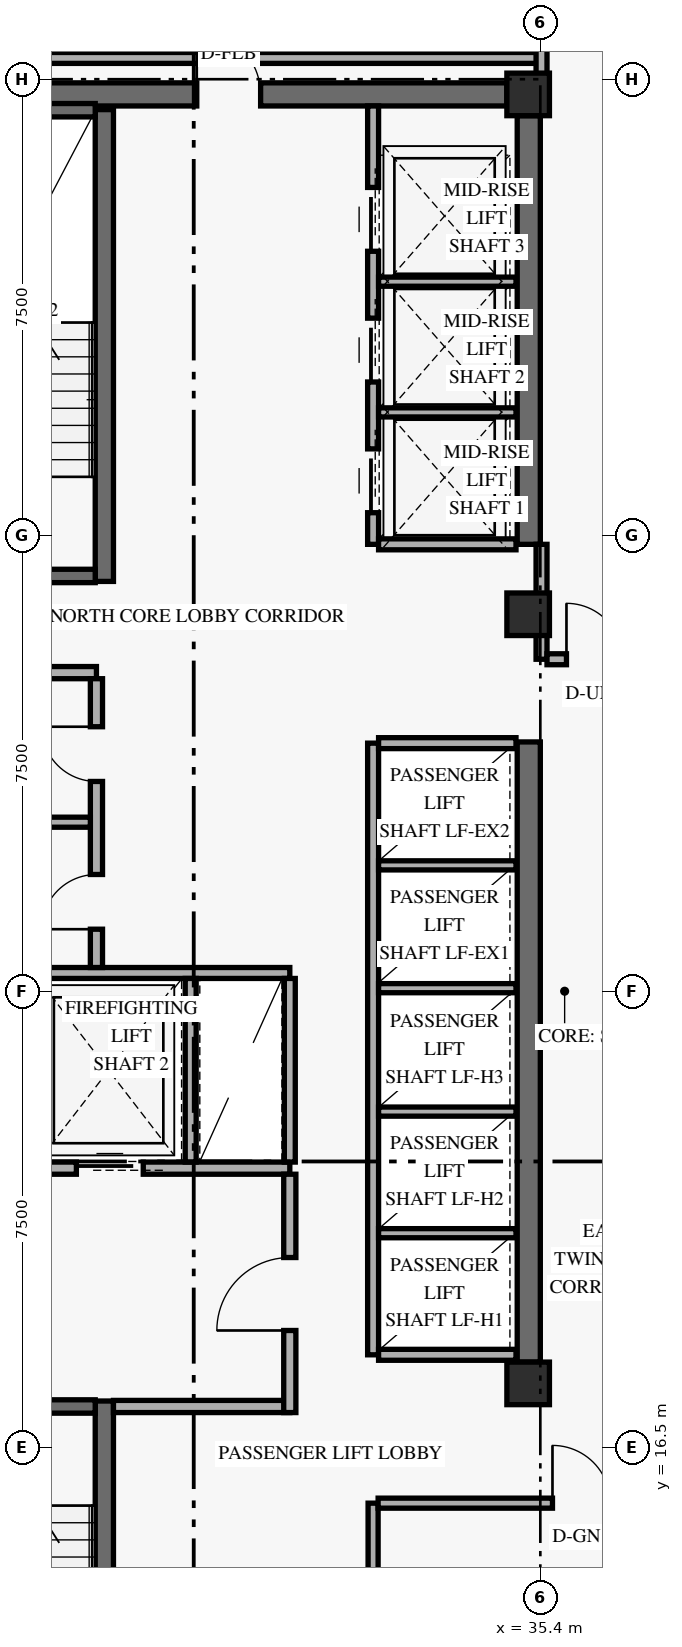
"""IFC4 building model, lengths in metres.
Left out: names, types, materials, properties, quantities, classifications, styles, units other than length and angle.
Written with IfcOpenShell. Run it as: python <this file> out.ifc"""

import sys

from ifc_helpers import new_model, si_unit, direction, frame, frame_2d, origin, origin_2d, place, context, subcontext, project, spatial, rectangle, extrude, element, fill, save


model = new_model("IFC4")
c1 = context("Model", 3, precision=1e-05, world=origin(), true_north=direction((0.0, 1.0)))
c2 = subcontext(c1, "Body", "Model", "MODEL_VIEW")
j1 = project(units=[si_unit("LENGTHUNIT", "METRE"), si_unit("PLANEANGLEUNIT", "RADIAN")], contexts=[c1])
p1 = place(None, origin())
s1 = spatial("IfcSite", under=j1, at=p1, CompositionType="ELEMENT")
p2 = place(p1, origin())
s2 = spatial("IfcBuilding", under=s1, at=p2, CompositionType="ELEMENT")
p3 = place(p2, frame((0.0, 0.0, 169.8)))
s3 = spatial("IfcBuildingStorey", under=s2, at=p3, CompositionType="ELEMENT", Elevation=169.8)
p4 = place(p3, frame((35.21, 17.9, 0.0), z_axis=(0.0, 0.0, 1.0), x_axis=(0.0, 1.0, 0.0)))
e1 = element("IfcWall", 1, at=p4, inside=s3, PredefinedType="SHEAR", context=c2, shape_type="SweptSolid", body=[
    extrude(rectangle(XDim=10.2, YDim=0.38, at=frame_2d((5.1, 0.0))), origin(), (0.0, 0.0, 1.0), 2.738),
])
p5 = place(p3, frame((35.21, 31.35, 0.0), z_axis=(0.0, 0.0, 1.0), x_axis=(0.0, 1.0, 0.0)))
e2 = element("IfcWall", 2, at=p5, inside=s3, PredefinedType="SHEAR", context=c2, shape_type="SweptSolid", body=[
    extrude(rectangle(XDim=7.05, YDim=0.38, at=frame_2d((3.525, 0.0))), origin(), (0.0, 0.0, 1.0), 2.738),
])
p6 = place(p3, frame((24.55, 38.75, 0.0), z_axis=(0.0, 0.0, 1.0), x_axis=(1.0, 0.0, 0.0)))
e3 = element("IfcWall", 3, at=p6, inside=s3, PredefinedType="SHEAR", context=c2, shape_type="SweptSolid", body=[
    extrude(rectangle(XDim=10.3, YDim=0.38, at=frame_2d((5.15, 0.0))), origin(), (0.0, 0.0, 1.0), 3.35),
])
p7 = place(p6, frame((5.2, 0.0, 0.0)))
e4 = element("IfcOpeningElement", 4, at=p7, cuts=e3, PredefinedType="OPENING", context=c2, shape_type="SweptSolid", body=[
    extrude(rectangle(XDim=1.05, YDim=2.15, at=frame_2d((0.525, 1.075))), frame((0.0, 0.2, 0.0), z_axis=(0.0, -1.0, 0.0), x_axis=(1.0, 0.0, 0.0)), (0.0, 0.0, 1.0), 0.4),
])
p8 = place(p3, frame((28.23, 9.5, 0.0), z_axis=(0.0, 0.0, 1.0), x_axis=(0.0, 1.0, 0.0)))
e5 = element("IfcWall", 5, at=p8, inside=s3, PredefinedType="SHEAR", context=c2, shape_type="SweptSolid", body=[
    extrude(rectangle(XDim=7.76, YDim=0.3, at=frame_2d((3.88, 0.0))), origin(), (0.0, 0.0, 1.0), 3.35),
])
p9 = place(p3, frame((24.92, 17.17, 0.0), z_axis=(0.0, 0.0, 1.0), x_axis=(1.0, 0.0, 0.0)))
e6 = element("IfcWall", 6, at=p9, inside=s3, PredefinedType="SHEAR", context=c2, shape_type="SweptSolid", body=[
    extrude(rectangle(XDim=3.16, YDim=0.22, at=frame_2d((1.58, 0.0))), origin(), (0.0, 0.0, 1.0), 3.35),
])
p10 = place(p9, frame((0.78, 0.0, 0.0)))
e7 = element("IfcOpeningElement", 7, at=p10, cuts=e6, PredefinedType="OPENING", context=c2, shape_type="SweptSolid", body=[
    extrude(rectangle(XDim=1.05, YDim=2.15, at=frame_2d((0.525, 1.075))), frame((0.0, 0.12, 0.0), z_axis=(0.0, -1.0, 0.0), x_axis=(1.0, 0.0, 0.0)), (0.0, 0.0, 1.0), 0.24),
])
p11 = place(p3, frame((28.23, 30.74, 0.0), z_axis=(0.0, 0.0, 1.0), x_axis=(0.0, 1.0, 0.0)))
e8 = element("IfcWall", 8, at=p11, inside=s3, PredefinedType="SHEAR", context=c2, shape_type="SweptSolid", body=[
    extrude(rectangle(XDim=7.76, YDim=0.3, at=frame_2d((3.88, 0.0))), origin(), (0.0, 0.0, 1.0), 3.35),
])
p12 = place(p3, frame((24.92, 30.83, 0.0), z_axis=(0.0, 0.0, 1.0), x_axis=(1.0, 0.0, 0.0)))
e9 = element("IfcWall", 9, at=p12, inside=s3, PredefinedType="SHEAR", context=c2, shape_type="SweptSolid", body=[
    extrude(rectangle(XDim=3.16, YDim=0.22, at=frame_2d((1.58, 0.0))), origin(), (0.0, 0.0, 1.0), 3.35),
])
p13 = place(p12, frame((0.78, 0.0, 0.0)))
e10 = element("IfcOpeningElement", 10, at=p13, cuts=e9, PredefinedType="OPENING", context=c2, shape_type="SweptSolid", body=[
    extrude(rectangle(XDim=1.05, YDim=2.15, at=frame_2d((0.525, 1.075))), frame((0.0, 0.12, 0.0), z_axis=(0.0, -1.0, 0.0), x_axis=(1.0, 0.0, 0.0)), (0.0, 0.0, 1.0), 0.24),
])
p14 = place(p3, frame((24.92, 38.49, 0.0), z_axis=(0.0, 0.0, 1.0), x_axis=(1.0, 0.0, 0.0)))
e11 = element("IfcWall", 11, at=p14, inside=s3, PredefinedType="SHEAR", context=c2, shape_type="SweptSolid", body=[
    extrude(rectangle(XDim=3.16, YDim=0.22, at=frame_2d((1.58, 0.0))), origin(), (0.0, 0.0, 1.0), 3.35),
])
for number, where, z_axis, x_axis in (
    (12, (35.2, 17.55, 0.0), (0.0, 0.0, 1.0), (1.0, 0.0, 0.0)),
    (13, (35.2, 30.2, 0.0), (0.0, 0.0, 1.0), (1.0, 0.0, 0.0)),
    (14, (35.2, 38.75, 0.0), (0.0, 0.0, 1.0), (1.0, 0.0, 0.0)),
):
    element("IfcColumn", number, at=place(p3, frame(where, z_axis=z_axis, x_axis=x_axis)), inside=s3, PredefinedType="COLUMN", context=c2, shape_type="SweptSolid", body=[
        extrude(rectangle(XDim=0.7, YDim=0.7, at=origin_2d()), origin(), (0.0, 0.0, 1.0), 3.6),
    ])
p15 = place(p3, frame((24.45, 21.09, 0.0), z_axis=(0.0, 0.0, 1.0), x_axis=(1.0, 0.0, 0.0)))
e15 = element("IfcWall", 15, at=p15, inside=s3, PredefinedType="STANDARD", context=c2, shape_type="SweptSolid", body=[
    extrude(rectangle(XDim=6.83, YDim=0.2, at=frame_2d((3.415, 0.0))), origin(), (0.0, 0.0, 1.0), 3.35),
])
p16 = place(p15, frame((0.72, 0.0, 0.0)))
e16 = element("IfcOpeningElement", 16, at=p16, cuts=e15, PredefinedType="OPENING", context=c2, shape_type="SweptSolid", body=[
    extrude(rectangle(XDim=1.1, YDim=2.2, at=frame_2d((0.55, 1.1))), frame((0.0, 0.11, 0.0), z_axis=(0.0, -1.0, 0.0), x_axis=(1.0, 0.0, 0.0)), (0.0, 0.0, 1.0), 0.22),
])
p17 = place(p15, frame((3.32, 0.0, 0.0)))
e17 = element("IfcOpeningElement", 17, at=p17, cuts=e15, PredefinedType="OPENING", context=c2, shape_type="SweptSolid", body=[
    extrude(rectangle(XDim=1.1, YDim=2.2, at=frame_2d((0.55, 1.1))), frame((0.0, 0.11, 0.0), z_axis=(0.0, -1.0, 0.0), x_axis=(1.0, 0.0, 0.0)), (0.0, 0.0, 1.0), 0.22),
])
p18 = place(p3, frame((28.38, 17.17, 0.0), z_axis=(0.0, 0.0, 1.0), x_axis=(1.0, 0.0, 0.0)))
e18 = element("IfcWall", 18, at=p18, inside=s3, PredefinedType="STANDARD", context=c2, shape_type="SweptSolid", body=[
    extrude(rectangle(XDim=2.9, YDim=0.2, at=frame_2d((1.45, 0.0))), origin(), (0.0, 0.0, 1.0), 3.35),
])
p19 = place(p3, frame((31.28, 17.07, 0.0), z_axis=(0.0, 0.0, 1.0), x_axis=(0.0, 1.0, 0.0)))
e19 = element("IfcWall", 19, at=p19, inside=s3, PredefinedType="STANDARD", context=c2, shape_type="SweptSolid", body=[
    extrude(rectangle(XDim=3.92, YDim=0.2, at=frame_2d((1.96, 0.0))), origin(), (0.0, 0.0, 1.0), 2.72),
])
p20 = place(p19, frame((1.35, 0.0, 0.0)))
e20 = element("IfcOpeningElement", 20, at=p20, cuts=e19, PredefinedType="OPENING", context=c2, shape_type="SweptSolid", body=[
    extrude(rectangle(XDim=1.2, YDim=2.15, at=frame_2d((0.6, 1.075))), frame((0.0, 0.11, 0.0), z_axis=(0.0, -1.0, 0.0), x_axis=(1.0, 0.0, 0.0)), (0.0, 0.0, 1.0), 0.22),
])
p21 = place(p3, frame((24.45, 24.3, 0.0), z_axis=(0.0, 0.0, 1.0), x_axis=(1.0, 0.0, 0.0)))
e21 = element("IfcWall", 21, at=p21, inside=s3, PredefinedType="STANDARD", context=c2, shape_type="SweptSolid", body=[
    extrude(rectangle(XDim=6.83, YDim=0.18, at=frame_2d((3.415, 0.0))), origin(), (0.0, 0.0, 1.0), 3.35),
])
for number, where, z_axis, x_axis in (
    (22, (29.65, 21.19, 0.0), (0.0, 0.0, 1.0), (0.0, 1.0, 0.0)),
    (23, (31.28, 21.19, 0.0), (0.0, 0.0, 1.0), (0.0, 1.0, 0.0)),
):
    element("IfcWall", number, at=place(p3, frame(where, z_axis=z_axis, x_axis=x_axis)), inside=s3, PredefinedType="STANDARD", context=c2, shape_type="SweptSolid", body=[
        extrude(rectangle(XDim=3.02, YDim=0.18, at=frame_2d((1.51, 0.0))), origin(), (0.0, 0.0, 1.0), 3.35),
    ])
p22 = place(p3, frame((24.45, 29.24, 0.0), z_axis=(0.0, 0.0, 1.0), x_axis=(1.0, 0.0, 0.0)))
e24 = element("IfcWall", 24, at=p22, inside=s3, PredefinedType="STANDARD", context=c2, shape_type="SweptSolid", body=[
    extrude(rectangle(XDim=3.65, YDim=0.2, at=frame_2d((1.825, 0.0))), origin(), (0.0, 0.0, 1.0), 3.35),
])
p23 = place(p3, frame((28.1, 24.39, 0.0), z_axis=(0.0, 0.0, 1.0), x_axis=(0.0, 1.0, 0.0)))
e25 = element("IfcWall", 25, at=p23, inside=s3, PredefinedType="STANDARD", context=c2, shape_type="SweptSolid", body=[
    extrude(rectangle(XDim=4.75, YDim=0.2, at=frame_2d((2.375, 0.0))), origin(), (0.0, 0.0, 1.0), 3.35),
])
p24 = place(p23, frame((0.63, 0.0, 0.0)))
e26 = element("IfcOpeningElement", 26, at=p24, cuts=e25, PredefinedType="OPENING", context=c2, shape_type="SweptSolid", body=[
    extrude(rectangle(XDim=0.9, YDim=2.1, at=frame_2d((0.45, 1.05))), frame((0.0, 0.11, 0.0), z_axis=(0.0, -1.0, 0.0), x_axis=(1.0, 0.0, 0.0)), (0.0, 0.0, 1.0), 0.22),
])
p25 = place(p23, frame((3.06, 0.0, 0.0)))
e27 = element("IfcOpeningElement", 27, at=p25, cuts=e25, PredefinedType="OPENING", context=c2, shape_type="SweptSolid", body=[
    extrude(rectangle(XDim=0.9, YDim=2.1, at=frame_2d((0.45, 1.05))), frame((0.0, 0.11, 0.0), z_axis=(0.0, -1.0, 0.0), x_axis=(1.0, 0.0, 0.0)), (0.0, 0.0, 1.0), 0.22),
])
p26 = place(p3, frame((24.45, 26.78, 0.0), z_axis=(0.0, 0.0, 1.0), x_axis=(1.0, 0.0, 0.0)))
e28 = element("IfcWall", 28, at=p26, inside=s3, PredefinedType="PARTITIONING", context=c2, shape_type="SweptSolid", body=[
    extrude(rectangle(XDim=3.55, YDim=0.165, at=frame_2d((1.775, 0.0))), origin(), (0.0, 0.0, 1.0), 3.35),
])
p27 = place(p3, frame((32.65, 18.02, 0.0), z_axis=(0.0, 0.0, 1.0), x_axis=(0.0, 1.0, 0.0)))
e29 = element("IfcWall", 29, at=p27, inside=s3, PredefinedType="STANDARD", context=c2, shape_type="SweptSolid", body=[
    extrude(rectangle(XDim=10.06, YDim=0.18, at=frame_2d((5.03, 0.0))), origin(), (0.0, 0.0, 1.0), 3.35),
])
for number, where, z_axis, x_axis in (
    (30, (32.74, 18.02, 0.0), (0.0, 0.0, 1.0), (1.0, 0.0, 0.0)),
    (31, (32.74, 28.08, 0.0), (0.0, 0.0, 1.0), (1.0, 0.0, 0.0)),
):
    element("IfcWall", number, at=place(p3, frame(where, z_axis=z_axis, x_axis=x_axis)), inside=s3, PredefinedType="STANDARD", context=c2, shape_type="SweptSolid", body=[
        extrude(rectangle(XDim=2.26, YDim=0.18, at=frame_2d((1.13, 0.0))), origin(), (0.0, 0.0, 1.0), 3.35),
    ])
for number, where, z_axis, x_axis in (
    (32, (32.74, 20.02, 0.0), (0.0, 0.0, 1.0), (1.0, 0.0, 0.0)),
    (33, (32.74, 22.02, 0.0), (0.0, 0.0, 1.0), (1.0, 0.0, 0.0)),
    (34, (32.74, 24.05, 0.0), (0.0, 0.0, 1.0), (1.0, 0.0, 0.0)),
    (35, (32.74, 26.07, 0.0), (0.0, 0.0, 1.0), (1.0, 0.0, 0.0)),
):
    element("IfcWall", number, at=place(p3, frame(where, z_axis=z_axis, x_axis=x_axis)), inside=s3, PredefinedType="STANDARD", context=c2, shape_type="SweptSolid", body=[
        extrude(rectangle(XDim=2.26, YDim=0.15, at=frame_2d((1.13, 0.0))), origin(), (0.0, 0.0, 1.0), 3.35),
    ])
p28 = place(p3, frame((32.65, 31.35, 0.0), z_axis=(0.0, 0.0, 1.0), x_axis=(0.0, 1.0, 0.0)))
e36 = element("IfcWall", 36, at=p28, inside=s3, PredefinedType="STANDARD", context=c2, shape_type="SweptSolid", body=[
    extrude(rectangle(XDim=7.21, YDim=0.18, at=frame_2d((3.605, 0.0))), origin(), (0.0, 0.0, 1.0), 3.35),
])
p29 = place(p28, frame((0.52, 0.0, 0.0)))
e37 = element("IfcOpeningElement", 37, at=p29, cuts=e36, PredefinedType="OPENING", context=c2, shape_type="SweptSolid", body=[
    extrude(rectangle(XDim=1.05, YDim=2.2, at=frame_2d((0.525, 1.1))), frame((0.0, 0.1, 0.0), z_axis=(0.0, -1.0, 0.0), x_axis=(1.0, 0.0, 0.0)), (0.0, 0.0, 1.0), 0.2),
])
p30 = place(p28, frame((2.67, 0.0, 0.0)))
e38 = element("IfcOpeningElement", 38, at=p30, cuts=e36, PredefinedType="OPENING", context=c2, shape_type="SweptSolid", body=[
    extrude(rectangle(XDim=1.05, YDim=2.2, at=frame_2d((0.525, 1.1))), frame((0.0, 0.1, 0.0), z_axis=(0.0, -1.0, 0.0), x_axis=(1.0, 0.0, 0.0)), (0.0, 0.0, 1.0), 0.2),
])
p31 = place(p28, frame((4.82, 0.0, 0.0)))
e39 = element("IfcOpeningElement", 39, at=p31, cuts=e36, PredefinedType="OPENING", context=c2, shape_type="SweptSolid", body=[
    extrude(rectangle(XDim=1.05, YDim=2.2, at=frame_2d((0.525, 1.1))), frame((0.0, 0.1, 0.0), z_axis=(0.0, -1.0, 0.0), x_axis=(1.0, 0.0, 0.0)), (0.0, 0.0, 1.0), 0.2),
])
p32 = place(p3, frame((32.74, 31.35, 0.0), z_axis=(0.0, 0.0, 1.0), x_axis=(1.0, 0.0, 0.0)))
e40 = element("IfcWall", 40, at=p32, inside=s3, PredefinedType="STANDARD", context=c2, shape_type="SweptSolid", body=[
    extrude(rectangle(XDim=2.26, YDim=0.18, at=frame_2d((1.13, 0.0))), origin(), (0.0, 0.0, 1.0), 3.35),
])
for number, where, z_axis, x_axis in (
    (41, (32.74, 33.52, 0.0), (0.0, 0.0, 1.0), (1.0, 0.0, 0.0)),
    (42, (32.74, 35.67, 0.0), (0.0, 0.0, 1.0), (1.0, 0.0, 0.0)),
):
    element("IfcWall", number, at=place(p3, frame(where, z_axis=z_axis, x_axis=x_axis)), inside=s3, PredefinedType="STANDARD", context=c2, shape_type="SweptSolid", body=[
        extrude(rectangle(XDim=2.26, YDim=0.15, at=frame_2d((1.13, 0.0))), origin(), (0.0, 0.0, 1.0), 3.35),
    ])
p33 = place(p3, frame((32.65, 9.5, 0.0), z_axis=(0.0, 0.0, 1.0), x_axis=(0.0, 1.0, 0.0)))
e43 = element("IfcWall", 43, at=p33, inside=s3, PredefinedType="PARTITIONING", context=c2, shape_type="SweptSolid", body=[
    extrude(rectangle(XDim=6.08, YDim=0.165, at=frame_2d((3.04, 0.0))), origin(), (0.0, 0.0, 1.0), 3.35),
])
p34 = place(p3, frame((32.732, 15.58, 0.0), z_axis=(0.0, 0.0, 1.0), x_axis=(1.0, 0.0, 0.0)))
e44 = element("IfcWall", 44, at=p34, inside=s3, PredefinedType="PARTITIONING", context=c2, shape_type="SweptSolid", body=[
    extrude(rectangle(XDim=5.618, YDim=0.165, at=frame_2d((2.809, 0.0))), origin(), (0.0, 0.0, 1.0), 2.72),
])
p35 = place(p34, frame((2.867, 0.0, 0.0)))
e45 = element("IfcOpeningElement", 45, at=p35, cuts=e44, PredefinedType="OPENING", context=c2, shape_type="SweptSolid", body=[
    extrude(rectangle(XDim=0.95, YDim=2.15, at=frame_2d((0.475, 1.075))), frame((0.0, 0.093, 0.0), z_axis=(0.0, -1.0, 0.0), x_axis=(1.0, 0.0, 0.0)), (0.0, 0.0, 1.0), 0.185),
])
p36 = place(p3, frame((35.42, 29.46, 0.0), z_axis=(0.0, 0.0, 1.0), x_axis=(0.0, 1.0, 0.0)))
e46 = element("IfcWall", 46, at=p36, inside=s3, PredefinedType="STANDARD", context=c2, shape_type="SweptSolid", body=[
    extrude(rectangle(XDim=1.89, YDim=0.18, at=frame_2d((0.945, 0.0))), origin(), (0.0, 0.0, 1.0), 2.72),
])
p37 = place(p3, frame((35.51, 29.46, 0.0), z_axis=(0.0, 0.0, 1.0), x_axis=(1.0, 0.0, 0.0)))
e47 = element("IfcWall", 47, at=p37, inside=s3, PredefinedType="STANDARD", context=c2, shape_type="SweptSolid", body=[
    extrude(rectangle(XDim=13.29, YDim=0.18, at=frame_2d((6.645, 0.0))), origin(), (0.0, 0.0, 1.0), 2.72),
])
p38 = place(p37, frame((0.32, 0.0, 0.0)))
e48 = element("IfcOpeningElement", 48, at=p38, cuts=e47, PredefinedType="OPENING", context=c2, shape_type="SweptSolid", body=[
    extrude(rectangle(XDim=0.92, YDim=2.15, at=frame_2d((0.46, 1.075))), frame((0.0, 0.1, 0.0), z_axis=(0.0, -1.0, 0.0), x_axis=(1.0, 0.0, 0.0)), (0.0, 0.0, 1.0), 0.2),
])
p39 = place(p3, frame((23.85, 39.35, 0.0), z_axis=(0.0, 0.0, 1.0), x_axis=(1.0, 0.0, 0.0)))
e49 = element("IfcWall", 49, at=p39, inside=s3, PredefinedType="STANDARD", context=c2, shape_type="SweptSolid", body=[
    extrude(rectangle(XDim=11.57, YDim=0.18, at=frame_2d((5.785, 0.0))), origin(), (0.0, 0.0, 1.0), 2.72),
])
p40 = place(p3, frame((35.42, 38.75, 0.0), z_axis=(0.0, 0.0, 1.0), x_axis=(0.0, 1.0, 0.0)))
e50 = element("IfcWall", 50, at=p40, inside=s3, PredefinedType="PARTITIONING", context=c2, shape_type="SweptSolid", body=[
    extrude(rectangle(XDim=4.97, YDim=0.18, at=frame_2d((2.485, 0.0))), origin(), (0.0, 0.0, 1.0), 2.72),
])
p41 = place(p17, origin())
e51 = element("IfcDoor", 51, at=p41, inside=s3, OperationType="SLIDING_TO_LEFT", PredefinedType="DOOR", context=c2, shape_type="SweptSolid", body=[
    extrude(rectangle(XDim=1.1, YDim=2.2, at=frame_2d((0.55, 1.1))), frame((0.0, 0.025, 0.0), z_axis=(0.0, -1.0, 0.0), x_axis=(1.0, 0.0, 0.0)), (0.0, 0.0, 1.0), 0.05),
])
fill(e17, e51)
p42 = place(p20, origin())
e52 = element("IfcDoor", 52, at=p42, inside=s3, OperationType="SINGLE_SWING_LEFT", PredefinedType="DOOR", context=c2, shape_type="SweptSolid", body=[
    extrude(rectangle(XDim=1.2, YDim=2.15, at=frame_2d((0.6, 1.075))), frame((0.0, 0.025, 0.0), z_axis=(0.0, -1.0, 0.0), x_axis=(1.0, 0.0, 0.0)), (0.0, 0.0, 1.0), 0.05),
])
fill(e20, e52)
p43 = place(p24, origin())
e53 = element("IfcDoor", 53, at=p43, inside=s3, OperationType="SINGLE_SWING_LEFT", PredefinedType="DOOR", context=c2, shape_type="SweptSolid", body=[
    extrude(rectangle(XDim=0.9, YDim=2.1, at=frame_2d((0.45, 1.05))), frame((0.0, 0.025, 0.0), z_axis=(0.0, -1.0, 0.0), x_axis=(1.0, 0.0, 0.0)), (0.0, 0.0, 1.0), 0.05),
])
fill(e26, e53)
p44 = place(p25, origin())
e54 = element("IfcDoor", 54, at=p44, inside=s3, OperationType="SINGLE_SWING_RIGHT", PredefinedType="DOOR", context=c2, shape_type="SweptSolid", body=[
    extrude(rectangle(XDim=0.9, YDim=2.1, at=frame_2d((0.45, 1.05))), frame((0.0, 0.025, 0.0), z_axis=(0.0, -1.0, 0.0), x_axis=(1.0, 0.0, 0.0)), (0.0, 0.0, 1.0), 0.05),
])
fill(e27, e54)
p45 = place(p29, origin())
e55 = element("IfcDoor", 55, at=p45, inside=s3, OperationType="SLIDING_TO_LEFT", PredefinedType="DOOR", context=c2, shape_type="SweptSolid", body=[
    extrude(rectangle(XDim=1.05, YDim=2.2, at=frame_2d((0.525, 1.1))), frame((0.0, 0.025, 0.0), z_axis=(0.0, -1.0, 0.0), x_axis=(1.0, 0.0, 0.0)), (0.0, 0.0, 1.0), 0.05),
])
fill(e37, e55)
p46 = place(p30, origin())
e56 = element("IfcDoor", 56, at=p46, inside=s3, OperationType="SLIDING_TO_LEFT", PredefinedType="DOOR", context=c2, shape_type="SweptSolid", body=[
    extrude(rectangle(XDim=1.05, YDim=2.2, at=frame_2d((0.525, 1.1))), frame((0.0, 0.025, 0.0), z_axis=(0.0, -1.0, 0.0), x_axis=(1.0, 0.0, 0.0)), (0.0, 0.0, 1.0), 0.05),
])
fill(e38, e56)
p47 = place(p31, origin())
e57 = element("IfcDoor", 57, at=p47, inside=s3, OperationType="SLIDING_TO_LEFT", PredefinedType="DOOR", context=c2, shape_type="SweptSolid", body=[
    extrude(rectangle(XDim=1.05, YDim=2.2, at=frame_2d((0.525, 1.1))), frame((0.0, 0.025, 0.0), z_axis=(0.0, -1.0, 0.0), x_axis=(1.0, 0.0, 0.0)), (0.0, 0.0, 1.0), 0.05),
])
fill(e39, e57)
p48 = place(p35, origin())
e58 = element("IfcDoor", 58, at=p48, inside=s3, OperationType="SINGLE_SWING_LEFT", PredefinedType="DOOR", context=c2, shape_type="SweptSolid", body=[
    extrude(rectangle(XDim=0.95, YDim=2.15, at=frame_2d((0.475, 1.075))), frame((0.0, 0.025, 0.0), z_axis=(0.0, -1.0, 0.0), x_axis=(1.0, 0.0, 0.0)), (0.0, 0.0, 1.0), 0.05),
])
fill(e45, e58)
p49 = place(p7, frame((1.05, 0.0, 0.0), z_axis=(0.0, 0.0, 1.0), x_axis=(-1.0, 0.0, 0.0)))
e59 = element("IfcDoor", 59, at=p49, inside=s3, OperationType="SINGLE_SWING_RIGHT", PredefinedType="DOOR", context=c2, shape_type="SweptSolid", body=[
    extrude(rectangle(XDim=1.05, YDim=2.15, at=frame_2d((0.525, 1.075))), frame((0.0, 0.025, 0.0), z_axis=(0.0, -1.0, 0.0), x_axis=(1.0, 0.0, 0.0)), (0.0, 0.0, 1.0), 0.05),
])
fill(e4, e59)
p50 = place(p38, origin())
e60 = element("IfcDoor", 60, at=p50, inside=s3, OperationType="SINGLE_SWING_LEFT", PredefinedType="DOOR", context=c2, shape_type="SweptSolid", body=[
    extrude(rectangle(XDim=0.92, YDim=2.15, at=frame_2d((0.46, 1.075))), frame((0.0, 0.025, 0.0), z_axis=(0.0, -1.0, 0.0), x_axis=(1.0, 0.0, 0.0)), (0.0, 0.0, 1.0), 0.05),
])
fill(e48, e60)
save(model, sys.argv[1])
